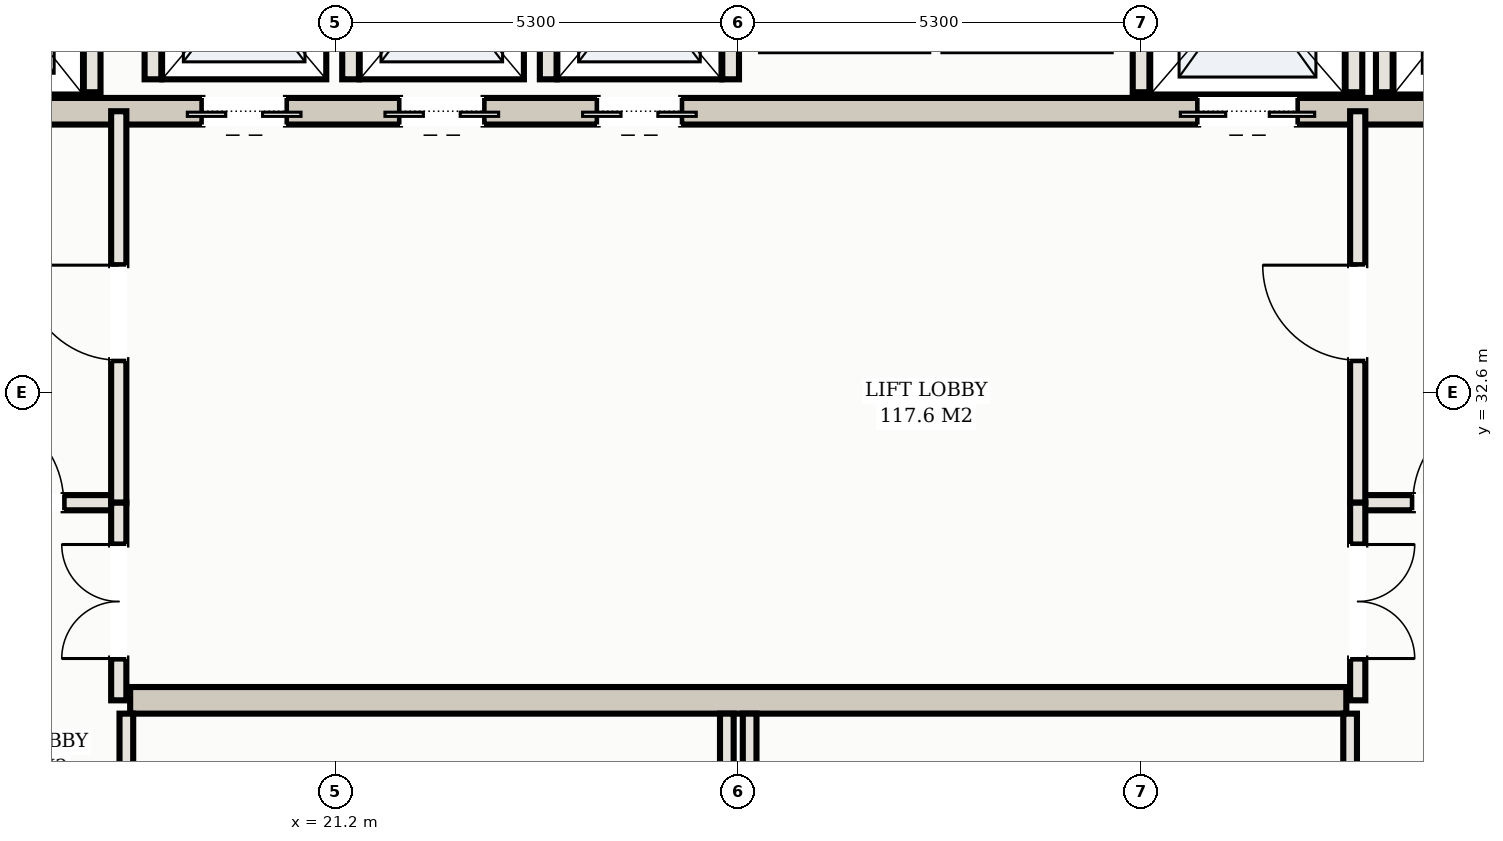
"""IFC4 building model, lengths in metres.
Left out: names, types, materials, properties, quantities, classifications, styles, units other than length and angle.
Written with IfcOpenShell. Run it as: python <this file> out.ifc"""

import sys

from ifc_helpers import new_model, si_unit, direction, frame, frame_2d, origin, place, context, subcontext, project, spatial, rectangle, extrude, element, fill, save


model = new_model("IFC4")
c1 = context("Model", 3, precision=1e-05, world=origin(), true_north=direction((0.0, 1.0)))
c2 = subcontext(c1, "Body", "Model", "MODEL_VIEW")
j1 = project(units=[si_unit("LENGTHUNIT", "METRE"), si_unit("PLANEANGLEUNIT", "RADIAN")], contexts=[c1])
p1 = place(None, origin())
s1 = spatial("IfcSite", under=j1, at=p1, CompositionType="ELEMENT")
p2 = place(p1, origin())
s2 = spatial("IfcBuilding", under=s1, at=p2, CompositionType="ELEMENT")
p3 = place(p2, frame((0.0, 0.0, 209.9)))
s3 = spatial("IfcBuildingStorey", under=s2, at=p3, CompositionType="ELEMENT", Elevation=209.9)
p4 = place(p3, frame((15.5, 36.3, 0.0), z_axis=(0.0, 0.0, 1.0), x_axis=(1.0, 0.0, 0.0)))
e1 = element("IfcWall", 1, at=p4, inside=s3, PredefinedType="SHEAR", context=c2, shape_type="SweptSolid", body=[
    extrude(rectangle(XDim=22.0, YDim=0.35, at=frame_2d((11.0, 0.0))), origin(), (0.0, 0.0, 1.0), 3.11),
])
p5 = place(p4, frame((0.65, 0.0, 0.0)))
e2 = element("IfcOpeningElement", 2, at=p5, cuts=e1, PredefinedType="OPENING", context=c2, shape_type="SweptSolid", body=[
    extrude(rectangle(XDim=1.1, YDim=2.15, at=frame_2d((0.55, 1.075))), frame((0.0, 0.185, 0.0), z_axis=(0.0, -1.0, 0.0), x_axis=(1.0, 0.0, 0.0)), (0.0, 0.0, 1.0), 0.37),
])
p6 = place(p4, frame((20.25, 0.0, 0.0)))
e3 = element("IfcOpeningElement", 3, at=p6, cuts=e1, PredefinedType="OPENING", context=c2, shape_type="SweptSolid", body=[
    extrude(rectangle(XDim=1.1, YDim=2.15, at=frame_2d((0.55, 1.075))), frame((0.0, 0.185, 0.0), z_axis=(0.0, -1.0, 0.0), x_axis=(1.0, 0.0, 0.0)), (0.0, 0.0, 1.0), 0.37),
])
p7 = place(p4, frame((17.05, 0.0, 0.0)))
e4 = element("IfcOpeningElement", 4, at=p7, cuts=e1, PredefinedType="OPENING", context=c2, shape_type="SweptSolid", body=[
    extrude(rectangle(XDim=1.3, YDim=2.2, at=frame_2d((0.65, 1.1))), frame((0.0, 0.185, 0.0), z_axis=(0.0, -1.0, 0.0), x_axis=(1.0, 0.0, 0.0)), (0.0, 0.0, 1.0), 0.37),
])
p8 = place(p4, frame((3.95, 0.0, 0.0)))
e5 = element("IfcOpeningElement", 5, at=p8, cuts=e1, PredefinedType="OPENING", context=c2, shape_type="SweptSolid", body=[
    extrude(rectangle(XDim=1.1, YDim=2.15, at=frame_2d((0.55, 1.075))), frame((0.0, 0.185, 0.0), z_axis=(0.0, -1.0, 0.0), x_axis=(1.0, 0.0, 0.0)), (0.0, 0.0, 1.0), 0.37),
])
p9 = place(p4, frame((6.55, 0.0, 0.0)))
e6 = element("IfcOpeningElement", 6, at=p9, cuts=e1, PredefinedType="OPENING", context=c2, shape_type="SweptSolid", body=[
    extrude(rectangle(XDim=1.1, YDim=2.15, at=frame_2d((0.55, 1.075))), frame((0.0, 0.185, 0.0), z_axis=(0.0, -1.0, 0.0), x_axis=(1.0, 0.0, 0.0)), (0.0, 0.0, 1.0), 0.37),
])
p10 = place(p4, frame((9.15, 0.0, 0.0)))
e7 = element("IfcOpeningElement", 7, at=p10, cuts=e1, PredefinedType="OPENING", context=c2, shape_type="SweptSolid", body=[
    extrude(rectangle(XDim=1.1, YDim=2.15, at=frame_2d((0.55, 1.075))), frame((0.0, 0.185, 0.0), z_axis=(0.0, -1.0, 0.0), x_axis=(1.0, 0.0, 0.0)), (0.0, 0.0, 1.0), 0.37),
])
p11 = place(p3, frame((18.5, 28.55, 0.0), z_axis=(0.0, 0.0, 1.0), x_axis=(1.0, 0.0, 0.0)))
e8 = element("IfcWall", 8, at=p11, inside=s3, PredefinedType="SHEAR", context=c2, shape_type="SweptSolid", body=[
    extrude(rectangle(XDim=16.0, YDim=0.35, at=frame_2d((8.0, 0.0))), origin(), (0.0, 0.0, 1.0), 3.11),
])
for number, where, z_axis, x_axis in (
    (9, (18.0, 36.55, 0.0), (0.0, 0.0, 1.0), (0.0, 1.0, 0.0)),
    (10, (35.0, 36.55, 0.0), (0.0, 0.0, 1.0), (0.0, 1.0, 0.0)),
    (11, (31.8, 36.55, 0.0), (0.0, 0.0, 1.0), (0.0, 1.0, 0.0)),
    (12, (34.6, 36.55, 0.0), (0.0, 0.0, 1.0), (0.0, 1.0, 0.0)),
):
    element("IfcWall", number, at=place(p3, frame(where, z_axis=z_axis, x_axis=x_axis)), inside=s3, PredefinedType="SOLIDWALL", context=c2, shape_type="SweptSolid", body=[
        extrude(rectangle(XDim=2.93, YDim=0.22, at=frame_2d((1.465, 0.0))), origin(), (0.0, 0.0, 1.0), 3.11),
    ])
for number, where, z_axis, x_axis in (
    (13, (18.8, 36.72, 0.0), (0.0, 0.0, 1.0), (0.0, 1.0, 0.0)),
    (14, (21.4, 36.72, 0.0), (0.0, 0.0, 1.0), (0.0, 1.0, 0.0)),
    (15, (24.0, 36.72, 0.0), (0.0, 0.0, 1.0), (0.0, 1.0, 0.0)),
    (16, (26.4, 36.72, 0.0), (0.0, 0.0, 1.0), (0.0, 1.0, 0.0)),
):
    element("IfcWall", number, at=place(p3, frame(where, z_axis=z_axis, x_axis=x_axis)), inside=s3, PredefinedType="SOLIDWALL", context=c2, shape_type="SweptSolid", body=[
        extrude(rectangle(XDim=2.56, YDim=0.22, at=frame_2d((1.28, 0.0))), origin(), (0.0, 0.0, 1.0), 3.11),
    ])
p12 = place(p3, frame((15.1, 31.15, 0.0), z_axis=(0.0, 0.0, 1.0), x_axis=(1.0, 0.0, 0.0)))
e17 = element("IfcWall", 17, at=p12, inside=s3, PredefinedType="PARTITIONING", context=c2, shape_type="SweptSolid", body=[
    extrude(rectangle(XDim=3.25, YDim=0.2, at=frame_2d((1.625, 0.0))), origin(), (0.0, 0.0, 1.0), 2.43),
])
p13 = place(p12, frame((1.275, 0.0, 0.0)))
e18 = element("IfcOpeningElement", 18, at=p13, cuts=e17, PredefinedType="OPENING", context=c2, shape_type="SweptSolid", body=[
    extrude(rectangle(XDim=1.25, YDim=2.2, at=frame_2d((0.625, 1.1))), frame((0.0, 0.11, 0.0), z_axis=(0.0, -1.0, 0.0), x_axis=(1.0, 0.0, 0.0)), (0.0, 0.0, 1.0), 0.22),
])
p14 = place(p3, frame((18.35, 31.15, 0.0), z_axis=(0.0, 0.0, 1.0), x_axis=(0.0, 1.0, 0.0)))
e19 = element("IfcWall", 19, at=p14, inside=s3, PredefinedType="PARTITIONING", context=c2, shape_type="SweptSolid", body=[
    extrude(rectangle(XDim=5.15, YDim=0.2, at=frame_2d((2.575, 0.0))), origin(), (0.0, 0.0, 1.0), 2.43),
])
p15 = place(p14, frame((1.875, 0.0, 0.0)))
e20 = element("IfcOpeningElement", 20, at=p15, cuts=e19, PredefinedType="OPENING", context=c2, shape_type="SweptSolid", body=[
    extrude(rectangle(XDim=1.25, YDim=2.2, at=frame_2d((0.625, 1.1))), frame((0.0, 0.11, 0.0), z_axis=(0.0, -1.0, 0.0), x_axis=(1.0, 0.0, 0.0)), (0.0, 0.0, 1.0), 0.22),
])
p16 = place(p3, frame((34.65, 31.15, 0.0), z_axis=(0.0, 0.0, 1.0), x_axis=(1.0, 0.0, 0.0)))
e21 = element("IfcWall", 21, at=p16, inside=s3, PredefinedType="PARTITIONING", context=c2, shape_type="SweptSolid", body=[
    extrude(rectangle(XDim=3.25, YDim=0.2, at=frame_2d((1.625, 0.0))), origin(), (0.0, 0.0, 1.0), 2.43),
])
p17 = place(p16, frame((0.725, 0.0, 0.0)))
e22 = element("IfcOpeningElement", 22, at=p17, cuts=e21, PredefinedType="OPENING", context=c2, shape_type="SweptSolid", body=[
    extrude(rectangle(XDim=1.25, YDim=2.2, at=frame_2d((0.625, 1.1))), frame((0.0, 0.11, 0.0), z_axis=(0.0, -1.0, 0.0), x_axis=(1.0, 0.0, 0.0)), (0.0, 0.0, 1.0), 0.22),
])
p18 = place(p3, frame((34.65, 31.15, 0.0), z_axis=(0.0, 0.0, 1.0), x_axis=(0.0, 1.0, 0.0)))
e23 = element("IfcWall", 23, at=p18, inside=s3, PredefinedType="PARTITIONING", context=c2, shape_type="SweptSolid", body=[
    extrude(rectangle(XDim=5.15, YDim=0.2, at=frame_2d((2.575, 0.0))), origin(), (0.0, 0.0, 1.0), 2.43),
])
p19 = place(p18, frame((1.875, 0.0, 0.0)))
e24 = element("IfcOpeningElement", 24, at=p19, cuts=e23, PredefinedType="OPENING", context=c2, shape_type="SweptSolid", body=[
    extrude(rectangle(XDim=1.25, YDim=2.2, at=frame_2d((0.625, 1.1))), frame((0.0, 0.11, 0.0), z_axis=(0.0, -1.0, 0.0), x_axis=(1.0, 0.0, 0.0)), (0.0, 0.0, 1.0), 0.22),
])
p20 = place(p3, frame((18.35, 28.55, 0.0), z_axis=(0.0, 0.0, 1.0), x_axis=(0.0, 1.0, 0.0)))
e25 = element("IfcWall", 25, at=p20, inside=s3, PredefinedType="PARTITIONING", context=c2, shape_type="SweptSolid", body=[
    extrude(rectangle(XDim=2.6, YDim=0.2, at=frame_2d((1.3, 0.0))), origin(), (0.0, 0.0, 1.0), 2.43),
])
p21 = place(p20, frame((0.55, 0.0, 0.0)))
e26 = element("IfcOpeningElement", 26, at=p21, cuts=e25, PredefinedType="OPENING", context=c2, shape_type="SweptSolid", body=[
    extrude(rectangle(XDim=1.5, YDim=2.25, at=frame_2d((0.75, 1.125))), frame((0.0, 0.11, 0.0), z_axis=(0.0, -1.0, 0.0), x_axis=(1.0, 0.0, 0.0)), (0.0, 0.0, 1.0), 0.22),
])
p22 = place(p3, frame((34.65, 28.55, 0.0), z_axis=(0.0, 0.0, 1.0), x_axis=(0.0, 1.0, 0.0)))
e27 = element("IfcWall", 27, at=p22, inside=s3, PredefinedType="PARTITIONING", context=c2, shape_type="SweptSolid", body=[
    extrude(rectangle(XDim=2.6, YDim=0.2, at=frame_2d((1.3, 0.0))), origin(), (0.0, 0.0, 1.0), 2.43),
])
p23 = place(p22, frame((0.55, 0.0, 0.0)))
e28 = element("IfcOpeningElement", 28, at=p23, cuts=e27, PredefinedType="OPENING", context=c2, shape_type="SweptSolid", body=[
    extrude(rectangle(XDim=1.5, YDim=2.25, at=frame_2d((0.75, 1.125))), frame((0.0, 0.11, 0.0), z_axis=(0.0, -1.0, 0.0), x_axis=(1.0, 0.0, 0.0)), (0.0, 0.0, 1.0), 0.22),
])
for number, where, z_axis, x_axis in (
    (29, (18.45, 25.62, 0.0), (0.0, 0.0, 1.0), (0.0, 1.0, 0.0)),
    (30, (26.35, 25.62, 0.0), (0.0, 0.0, 1.0), (0.0, 1.0, 0.0)),
    (31, (26.65, 25.62, 0.0), (0.0, 0.0, 1.0), (0.0, 1.0, 0.0)),
    (32, (34.55, 25.62, 0.0), (0.0, 0.0, 1.0), (0.0, 1.0, 0.0)),
):
    element("IfcWall", number, at=place(p3, frame(where, z_axis=z_axis, x_axis=x_axis)), inside=s3, PredefinedType="PARTITIONING", context=c2, shape_type="SweptSolid", body=[
        extrude(rectangle(XDim=2.755, YDim=0.18, at=frame_2d((1.377, 0.0))), origin(), (0.0, 0.0, 1.0), 2.43),
    ])
p24 = place(p7, frame((1.3, 0.0, 0.0), z_axis=(0.0, 0.0, 1.0), x_axis=(-1.0, 0.0, 0.0)))
e33 = element("IfcDoor", 33, at=p24, inside=s3, OperationType="DOUBLE_DOOR_SLIDING", PredefinedType="DOOR", context=c2, shape_type="SweptSolid", body=[
    extrude(rectangle(XDim=1.3, YDim=2.2, at=frame_2d((0.65, 1.1))), frame((0.0, 0.025, 0.0), z_axis=(0.0, -1.0, 0.0), x_axis=(1.0, 0.0, 0.0)), (0.0, 0.0, 1.0), 0.05),
])
fill(e4, e33)
p25 = place(p8, frame((1.1, 0.0, 0.0), z_axis=(0.0, 0.0, 1.0), x_axis=(-1.0, 0.0, 0.0)))
e34 = element("IfcDoor", 34, at=p25, inside=s3, OperationType="DOUBLE_DOOR_SLIDING", PredefinedType="DOOR", context=c2, shape_type="SweptSolid", body=[
    extrude(rectangle(XDim=1.1, YDim=2.15, at=frame_2d((0.55, 1.075))), frame((0.0, 0.025, 0.0), z_axis=(0.0, -1.0, 0.0), x_axis=(1.0, 0.0, 0.0)), (0.0, 0.0, 1.0), 0.05),
])
fill(e5, e34)
p26 = place(p9, frame((1.1, 0.0, 0.0), z_axis=(0.0, 0.0, 1.0), x_axis=(-1.0, 0.0, 0.0)))
e35 = element("IfcDoor", 35, at=p26, inside=s3, OperationType="DOUBLE_DOOR_SLIDING", PredefinedType="DOOR", context=c2, shape_type="SweptSolid", body=[
    extrude(rectangle(XDim=1.1, YDim=2.15, at=frame_2d((0.55, 1.075))), frame((0.0, 0.025, 0.0), z_axis=(0.0, -1.0, 0.0), x_axis=(1.0, 0.0, 0.0)), (0.0, 0.0, 1.0), 0.05),
])
fill(e6, e35)
p27 = place(p10, frame((1.1, 0.0, 0.0), z_axis=(0.0, 0.0, 1.0), x_axis=(-1.0, 0.0, 0.0)))
e36 = element("IfcDoor", 36, at=p27, inside=s3, OperationType="DOUBLE_DOOR_SLIDING", PredefinedType="DOOR", context=c2, shape_type="SweptSolid", body=[
    extrude(rectangle(XDim=1.1, YDim=2.15, at=frame_2d((0.55, 1.075))), frame((0.0, 0.025, 0.0), z_axis=(0.0, -1.0, 0.0), x_axis=(1.0, 0.0, 0.0)), (0.0, 0.0, 1.0), 0.05),
])
fill(e7, e36)
p28 = place(p13, origin())
e37 = element("IfcDoor", 37, at=p28, inside=s3, OperationType="SINGLE_SWING_LEFT", PredefinedType="DOOR", context=c2, shape_type="SweptSolid", body=[
    extrude(rectangle(XDim=1.25, YDim=2.2, at=frame_2d((0.625, 1.1))), frame((0.0, 0.025, 0.0), z_axis=(0.0, -1.0, 0.0), x_axis=(1.0, 0.0, 0.0)), (0.0, 0.0, 1.0), 0.05),
])
fill(e18, e37)
p29 = place(p15, origin())
e38 = element("IfcDoor", 38, at=p29, inside=s3, OperationType="SINGLE_SWING_RIGHT", PredefinedType="DOOR", context=c2, shape_type="SweptSolid", body=[
    extrude(rectangle(XDim=1.25, YDim=2.2, at=frame_2d((0.625, 1.1))), frame((0.0, 0.025, 0.0), z_axis=(0.0, -1.0, 0.0), x_axis=(1.0, 0.0, 0.0)), (0.0, 0.0, 1.0), 0.05),
])
fill(e20, e38)
p30 = place(p17, origin())
e39 = element("IfcDoor", 39, at=p30, inside=s3, OperationType="SINGLE_SWING_RIGHT", PredefinedType="DOOR", context=c2, shape_type="SweptSolid", body=[
    extrude(rectangle(XDim=1.25, YDim=2.2, at=frame_2d((0.625, 1.1))), frame((0.0, 0.025, 0.0), z_axis=(0.0, -1.0, 0.0), x_axis=(1.0, 0.0, 0.0)), (0.0, 0.0, 1.0), 0.05),
])
fill(e22, e39)
p31 = place(p19, origin())
e40 = element("IfcDoor", 40, at=p31, inside=s3, OperationType="SINGLE_SWING_RIGHT", PredefinedType="DOOR", context=c2, shape_type="SweptSolid", body=[
    extrude(rectangle(XDim=1.25, YDim=2.2, at=frame_2d((0.625, 1.1))), frame((0.0, 0.025, 0.0), z_axis=(0.0, -1.0, 0.0), x_axis=(1.0, 0.0, 0.0)), (0.0, 0.0, 1.0), 0.05),
])
fill(e24, e40)
p32 = place(p21, origin())
e41 = element("IfcDoor", 41, at=p32, inside=s3, OperationType="DOUBLE_DOOR_SINGLE_SWING", PredefinedType="DOOR", context=c2, shape_type="SweptSolid", body=[
    extrude(rectangle(XDim=1.5, YDim=2.25, at=frame_2d((0.75, 1.125))), frame((0.0, 0.025, 0.0), z_axis=(0.0, -1.0, 0.0), x_axis=(1.0, 0.0, 0.0)), (0.0, 0.0, 1.0), 0.05),
])
fill(e26, e41)
p33 = place(p23, frame((1.5, 0.0, 0.0), z_axis=(0.0, 0.0, 1.0), x_axis=(-1.0, 0.0, 0.0)))
e42 = element("IfcDoor", 42, at=p33, inside=s3, OperationType="DOUBLE_DOOR_SINGLE_SWING", PredefinedType="DOOR", context=c2, shape_type="SweptSolid", body=[
    extrude(rectangle(XDim=1.5, YDim=2.25, at=frame_2d((0.75, 1.125))), frame((0.0, 0.025, 0.0), z_axis=(0.0, -1.0, 0.0), x_axis=(1.0, 0.0, 0.0)), (0.0, 0.0, 1.0), 0.05),
])
fill(e28, e42)
save(model, sys.argv[1])
